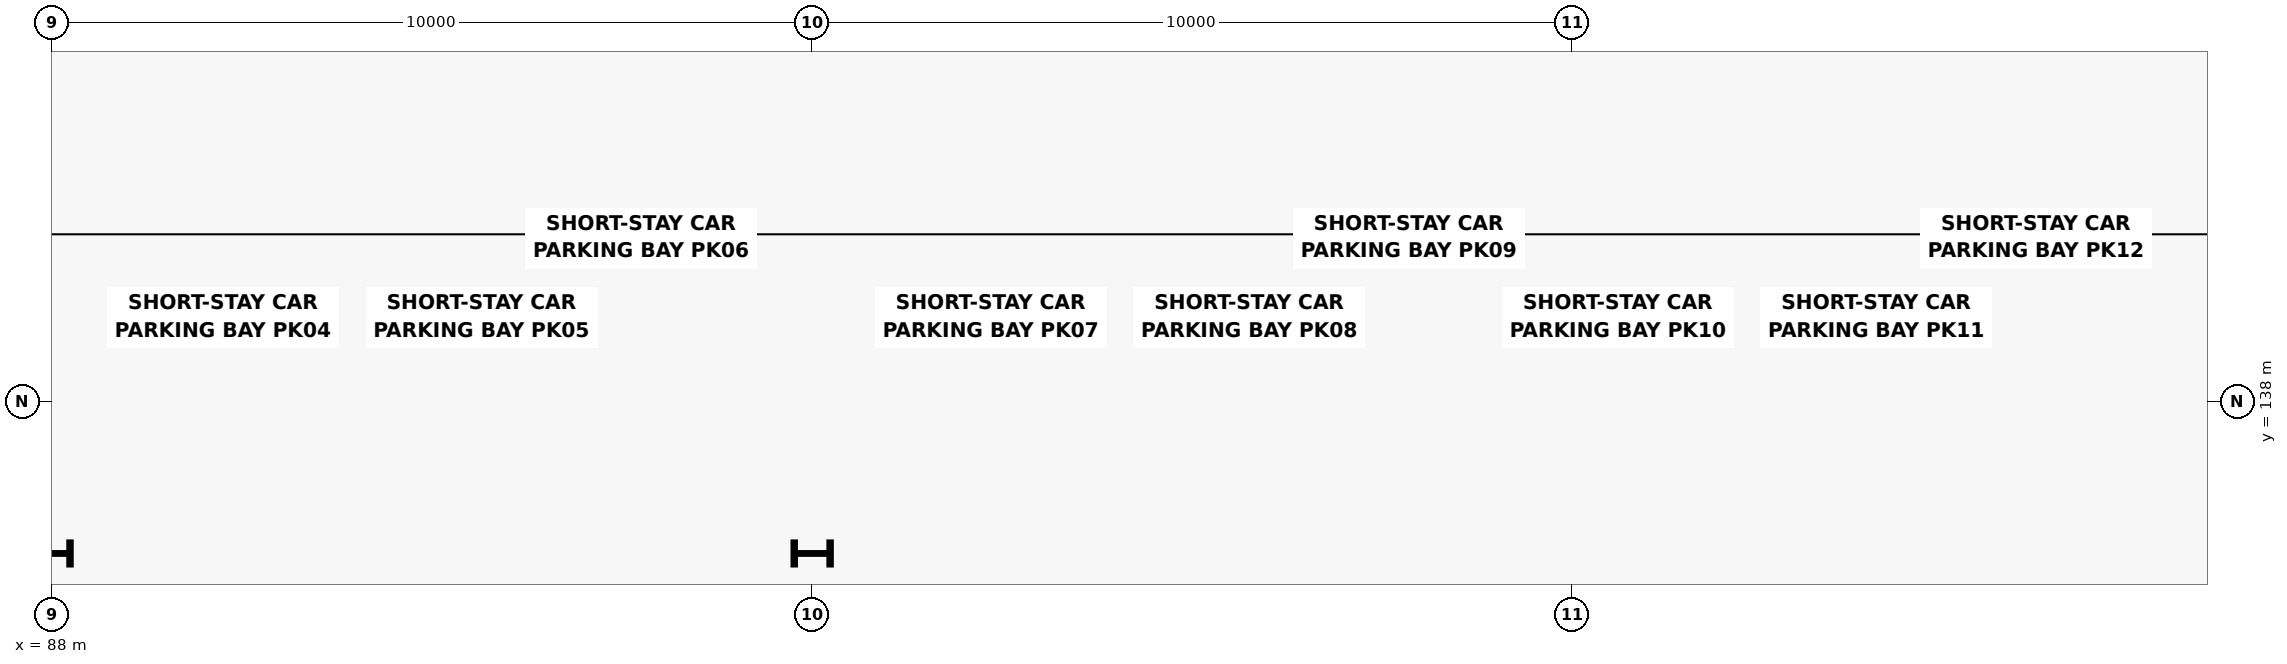
"""IFC4 building model, lengths in metres.
Left out: names, types, materials, properties, quantities, classifications, styles, units other than length and angle.
Written with IfcOpenShell. Run it as: python <this file> out.ifc"""

import sys

from ifc_helpers import new_model, si_unit, direction, frame, origin, origin_2d, place, context, subcontext, project, spatial, i_section, extrude, element, save


model = new_model("IFC4")
c1 = context("Model", 3, precision=1e-05, world=origin(), true_north=direction((0.0, 1.0)))
c2 = subcontext(c1, "Body", "Model", "MODEL_VIEW")
j1 = project(units=[si_unit("LENGTHUNIT", "METRE"), si_unit("PLANEANGLEUNIT", "RADIAN")], contexts=[c1])
p1 = place(None, origin())
s1 = spatial("IfcSite", under=j1, at=p1, CompositionType="ELEMENT")
p2 = place(p1, origin())
s2 = spatial("IfcBuilding", under=s1, at=p2, CompositionType="ELEMENT")
p3 = place(p2, origin())
s3 = spatial("IfcBuildingStorey", under=s2, at=p3, CompositionType="ELEMENT", Elevation=0.0)
for number, where, z_axis, x_axis in (
    (1, (88.0, 136.0, 0.0), (0.0, 0.0, 1.0), (1.0, 0.0, 0.0)),
    (2, (98.0, 136.0, 0.0), (0.0, 0.0, 1.0), (1.0, 0.0, 0.0)),
):
    element("IfcColumn", number, at=place(p3, frame(where, z_axis=z_axis, x_axis=x_axis)), inside=s3, PredefinedType="COLUMN", context=c2, shape_type="SweptSolid", body=[
        extrude(i_section(OverallWidth=0.3, OverallDepth=0.5, WebThickness=0.014, FlangeThickness=0.028, FilletRadius=0.027, at=origin_2d()), origin(), (0.0, 0.0, 1.0), 5.4),
    ])
save(model, sys.argv[1])
